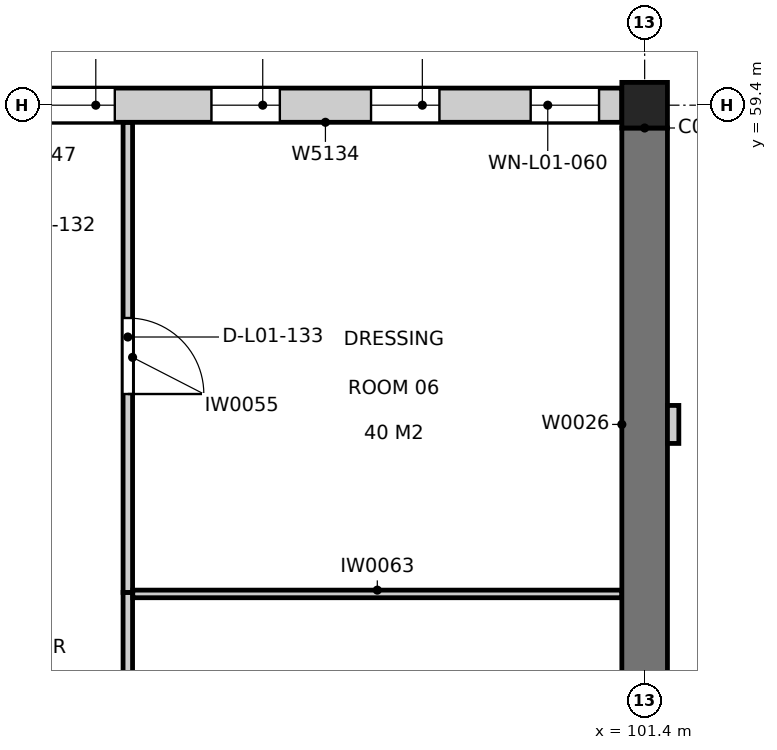
"""IFC4 building model, lengths in metres.
Left out: names, types, materials, properties, quantities, classifications, styles, units other than length and angle.
Written with IfcOpenShell. Run it as: python <this file> out.ifc"""

import sys

from ifc_helpers import new_model, si_unit, direction, frame, frame_2d, origin, origin_2d, place, context, subcontext, project, spatial, rectangle, extrude, element, fill, save


model = new_model("IFC4")
c1 = context("Model", 3, precision=1e-05, world=origin(), true_north=direction((0.0, 1.0)))
c2 = subcontext(c1, "Body", "Model", "MODEL_VIEW")
j1 = project(units=[si_unit("LENGTHUNIT", "METRE"), si_unit("PLANEANGLEUNIT", "RADIAN")], contexts=[c1])
p1 = place(None, origin())
s1 = spatial("IfcSite", under=j1, at=p1, CompositionType="ELEMENT")
p2 = place(p1, origin())
s2 = spatial("IfcBuilding", under=s1, at=p2, CompositionType="ELEMENT")
p3 = place(p2, frame((0.0, 0.0, 4.8)))
s3 = spatial("IfcBuildingStorey", under=s2, at=p3, CompositionType="ELEMENT", Elevation=4.8)
p4 = place(p3, frame((101.4, 59.4, 0.0), z_axis=(0.0, 0.0, 1.0), x_axis=(1.0, 0.0, 0.0)))
e1 = element("IfcColumn", 1, at=p4, inside=s3, PredefinedType="COLUMN", context=c2, shape_type="SweptSolid", body=[
    extrude(rectangle(XDim=0.6, YDim=0.6, at=origin_2d()), origin(), (0.0, 0.0, 1.0), 4.8),
])
p5 = place(p3, frame((101.4, 51.3, 0.0), z_axis=(0.0, 0.0, 1.0), x_axis=(0.0, 1.0, 0.0)))
e2 = element("IfcWall", 2, at=p5, inside=s3, PredefinedType="SOLIDWALL", context=c2, shape_type="SweptSolid", body=[
    extrude(rectangle(XDim=7.8, YDim=0.6, at=frame_2d((3.9, 0.0))), origin(), (0.0, 0.0, 1.0), 4.8),
])
p6 = place(p3, frame((94.6, 52.99, 0.0), z_axis=(0.0, 0.0, 1.0), x_axis=(-0.000151756581, -0.999999988485, 0.0)))
e3 = element("IfcWall", 3, at=p6, inside=s3, PredefinedType="PARTITIONING", context=c2, shape_type="SweptSolid", body=[
    extrude(rectangle(XDim=6.435, YDim=0.125, at=frame_2d((3.218, 0.0))), origin(), (0.0, 0.0, 1.0), 3.84),
])
p7 = place(p6, frame((2.747, 0.0, 0.0)))
e4 = element("IfcOpeningElement", 4, at=p7, cuts=e3, PredefinedType="OPENING", context=c2, shape_type="SweptSolid", body=[
    extrude(rectangle(XDim=1.0, YDim=2.1, at=frame_2d((0.5, 1.05))), frame((0.0, 0.073, 0.0), z_axis=(0.0, -1.0, 0.0), x_axis=(1.0, 0.0, 0.0)), (0.0, 0.0, 1.0), 0.145),
])
p8 = place(p3, frame((94.6, 59.175, 0.0), z_axis=(0.0, 0.0, 1.0), x_axis=(0.0, -1.0, 0.0)))
e5 = element("IfcWall", 5, at=p8, inside=s3, PredefinedType="PARTITIONING", context=c2, shape_type="SweptSolid", body=[
    extrude(rectangle(XDim=6.185, YDim=0.125, at=frame_2d((3.092, 0.0))), origin(), (0.0, 0.0, 1.0), 3.94),
])
p9 = place(p8, frame((2.575, 0.0, 0.0)))
e6 = element("IfcOpeningElement", 6, at=p9, cuts=e5, PredefinedType="OPENING", context=c2, shape_type="SweptSolid", body=[
    extrude(rectangle(XDim=1.0, YDim=2.1, at=frame_2d((0.5, 1.05))), frame((0.0, 0.073, 0.0), z_axis=(0.0, -1.0, 0.0), x_axis=(1.0, 0.0, 0.0)), (0.0, 0.0, 1.0), 0.145),
])
p10 = place(p3, frame((94.665, 52.97, 0.0), z_axis=(0.0, 0.0, 1.0), x_axis=(1.0, 0.0, 0.0)))
e7 = element("IfcWall", 7, at=p10, inside=s3, PredefinedType="PARTITIONING", context=c2, shape_type="SweptSolid", body=[
    extrude(rectangle(XDim=6.435, YDim=0.1, at=frame_2d((3.218, 0.0))), origin(), (0.0, 0.0, 1.0), 4.64),
])
p11 = place(p3, frame((101.1, 59.4, 0.0), z_axis=(0.0, 0.0, 1.0), x_axis=(-1.0, 0.0, 0.0)))
e8 = element("IfcWall", 8, at=p11, inside=s3, PredefinedType="SOLIDWALL", context=c2, shape_type="SweptSolid", body=[
    extrude(rectangle(XDim=7.8, YDim=0.45, at=frame_2d((3.9, 0.0))), origin(), (0.0, 0.0, 1.0), 3.84),
])
p12 = place(p11, frame((6.671, 0.0, 0.9)))
e9 = element("IfcOpeningElement", 9, at=p12, cuts=e8, PredefinedType="OPENING", context=c2, shape_type="SweptSolid", body=[
    extrude(rectangle(XDim=1.0, YDim=2.4, at=frame_2d((0.5, 1.2))), frame((0.0, 0.235, 0.0), z_axis=(0.0, -1.0, 0.0), x_axis=(1.0, 0.0, 0.0)), (0.0, 0.0, 1.0), 0.47),
])
p13 = place(p11, frame((4.5, 0.0, 1.8)))
e10 = element("IfcOpeningElement", 10, at=p13, cuts=e8, PredefinedType="OPENING", context=c2, shape_type="SweptSolid", body=[
    extrude(rectangle(XDim=0.9, YDim=0.6, at=frame_2d((0.45, 0.3))), frame((0.0, 0.235, 0.0), z_axis=(0.0, -1.0, 0.0), x_axis=(1.0, 0.0, 0.0)), (0.0, 0.0, 1.0), 0.47),
])
p14 = place(p11, frame((2.4, 0.0, 1.8)))
e11 = element("IfcOpeningElement", 11, at=p14, cuts=e8, PredefinedType="OPENING", context=c2, shape_type="SweptSolid", body=[
    extrude(rectangle(XDim=0.9, YDim=0.6, at=frame_2d((0.45, 0.3))), frame((0.0, 0.235, 0.0), z_axis=(0.0, -1.0, 0.0), x_axis=(1.0, 0.0, 0.0)), (0.0, 0.0, 1.0), 0.47),
])
p15 = place(p11, frame((0.3, 0.0, 1.8)))
e12 = element("IfcOpeningElement", 12, at=p15, cuts=e8, PredefinedType="OPENING", context=c2, shape_type="SweptSolid", body=[
    extrude(rectangle(XDim=0.9, YDim=0.6, at=frame_2d((0.45, 0.3))), frame((0.0, 0.235, 0.0), z_axis=(0.0, -1.0, 0.0), x_axis=(1.0, 0.0, 0.0)), (0.0, 0.0, 1.0), 0.47),
])
p16 = place(p3, frame((101.775, 54.95, 0.0), z_axis=(0.0, 0.0, 1.0), x_axis=(0.0, 1.0, 0.0)))
e13 = element("IfcWall", 13, at=p16, inside=s3, PredefinedType="SOLIDWALL", context=c2, shape_type="SweptSolid", body=[
    extrude(rectangle(XDim=0.5, YDim=0.15, at=frame_2d((0.25, 0.0))), origin(), (0.0, 0.0, 1.0), 4.8),
])
p17 = place(p9, origin())
e14 = element("IfcDoor", 14, at=p17, inside=s3, OperationType="SINGLE_SWING_RIGHT", PredefinedType="DOOR", context=c2, shape_type="SweptSolid", body=[
    extrude(rectangle(XDim=1.0, YDim=2.1, at=frame_2d((0.5, 1.05))), frame((0.0, 0.025, 0.0), z_axis=(0.0, -1.0, 0.0), x_axis=(1.0, 0.0, 0.0)), (0.0, 0.0, 1.0), 0.05),
])
fill(e6, e14)
p18 = place(p12, origin())
e15 = element("IfcWindow", 15, at=p18, inside=s3, PartitioningType="SINGLE_PANEL", PredefinedType="WINDOW", context=c2, shape_type="SweptSolid", body=[
    extrude(rectangle(XDim=1.0, YDim=2.4, at=frame_2d((0.5, 1.2))), frame((0.0, 0.135, 0.0), z_axis=(0.0, -1.0, 0.0), x_axis=(1.0, 0.0, 0.0)), (0.0, 0.0, 1.0), 0.06),
])
fill(e9, e15)
p19 = place(p13, origin())
e16 = element("IfcWindow", 16, at=p19, inside=s3, PartitioningType="SINGLE_PANEL", PredefinedType="WINDOW", context=c2, shape_type="SweptSolid", body=[
    extrude(rectangle(XDim=0.9, YDim=0.6, at=frame_2d((0.45, 0.3))), frame((0.0, 0.035, 0.0), z_axis=(0.0, -1.0, 0.0), x_axis=(1.0, 0.0, 0.0)), (0.0, 0.0, 1.0), 0.06),
])
fill(e10, e16)
p20 = place(p14, origin())
e17 = element("IfcWindow", 17, at=p20, inside=s3, PartitioningType="SINGLE_PANEL", PredefinedType="WINDOW", context=c2, shape_type="SweptSolid", body=[
    extrude(rectangle(XDim=0.9, YDim=0.6, at=frame_2d((0.45, 0.3))), frame((0.0, 0.035, 0.0), z_axis=(0.0, -1.0, 0.0), x_axis=(1.0, 0.0, 0.0)), (0.0, 0.0, 1.0), 0.06),
])
fill(e11, e17)
p21 = place(p15, origin())
e18 = element("IfcWindow", 18, at=p21, inside=s3, PartitioningType="SINGLE_PANEL", PredefinedType="WINDOW", context=c2, shape_type="SweptSolid", body=[
    extrude(rectangle(XDim=0.9, YDim=0.6, at=frame_2d((0.45, 0.3))), frame((0.0, 0.035, 0.0), z_axis=(0.0, -1.0, 0.0), x_axis=(1.0, 0.0, 0.0)), (0.0, 0.0, 1.0), 0.06),
])
fill(e12, e18)
save(model, sys.argv[1])
